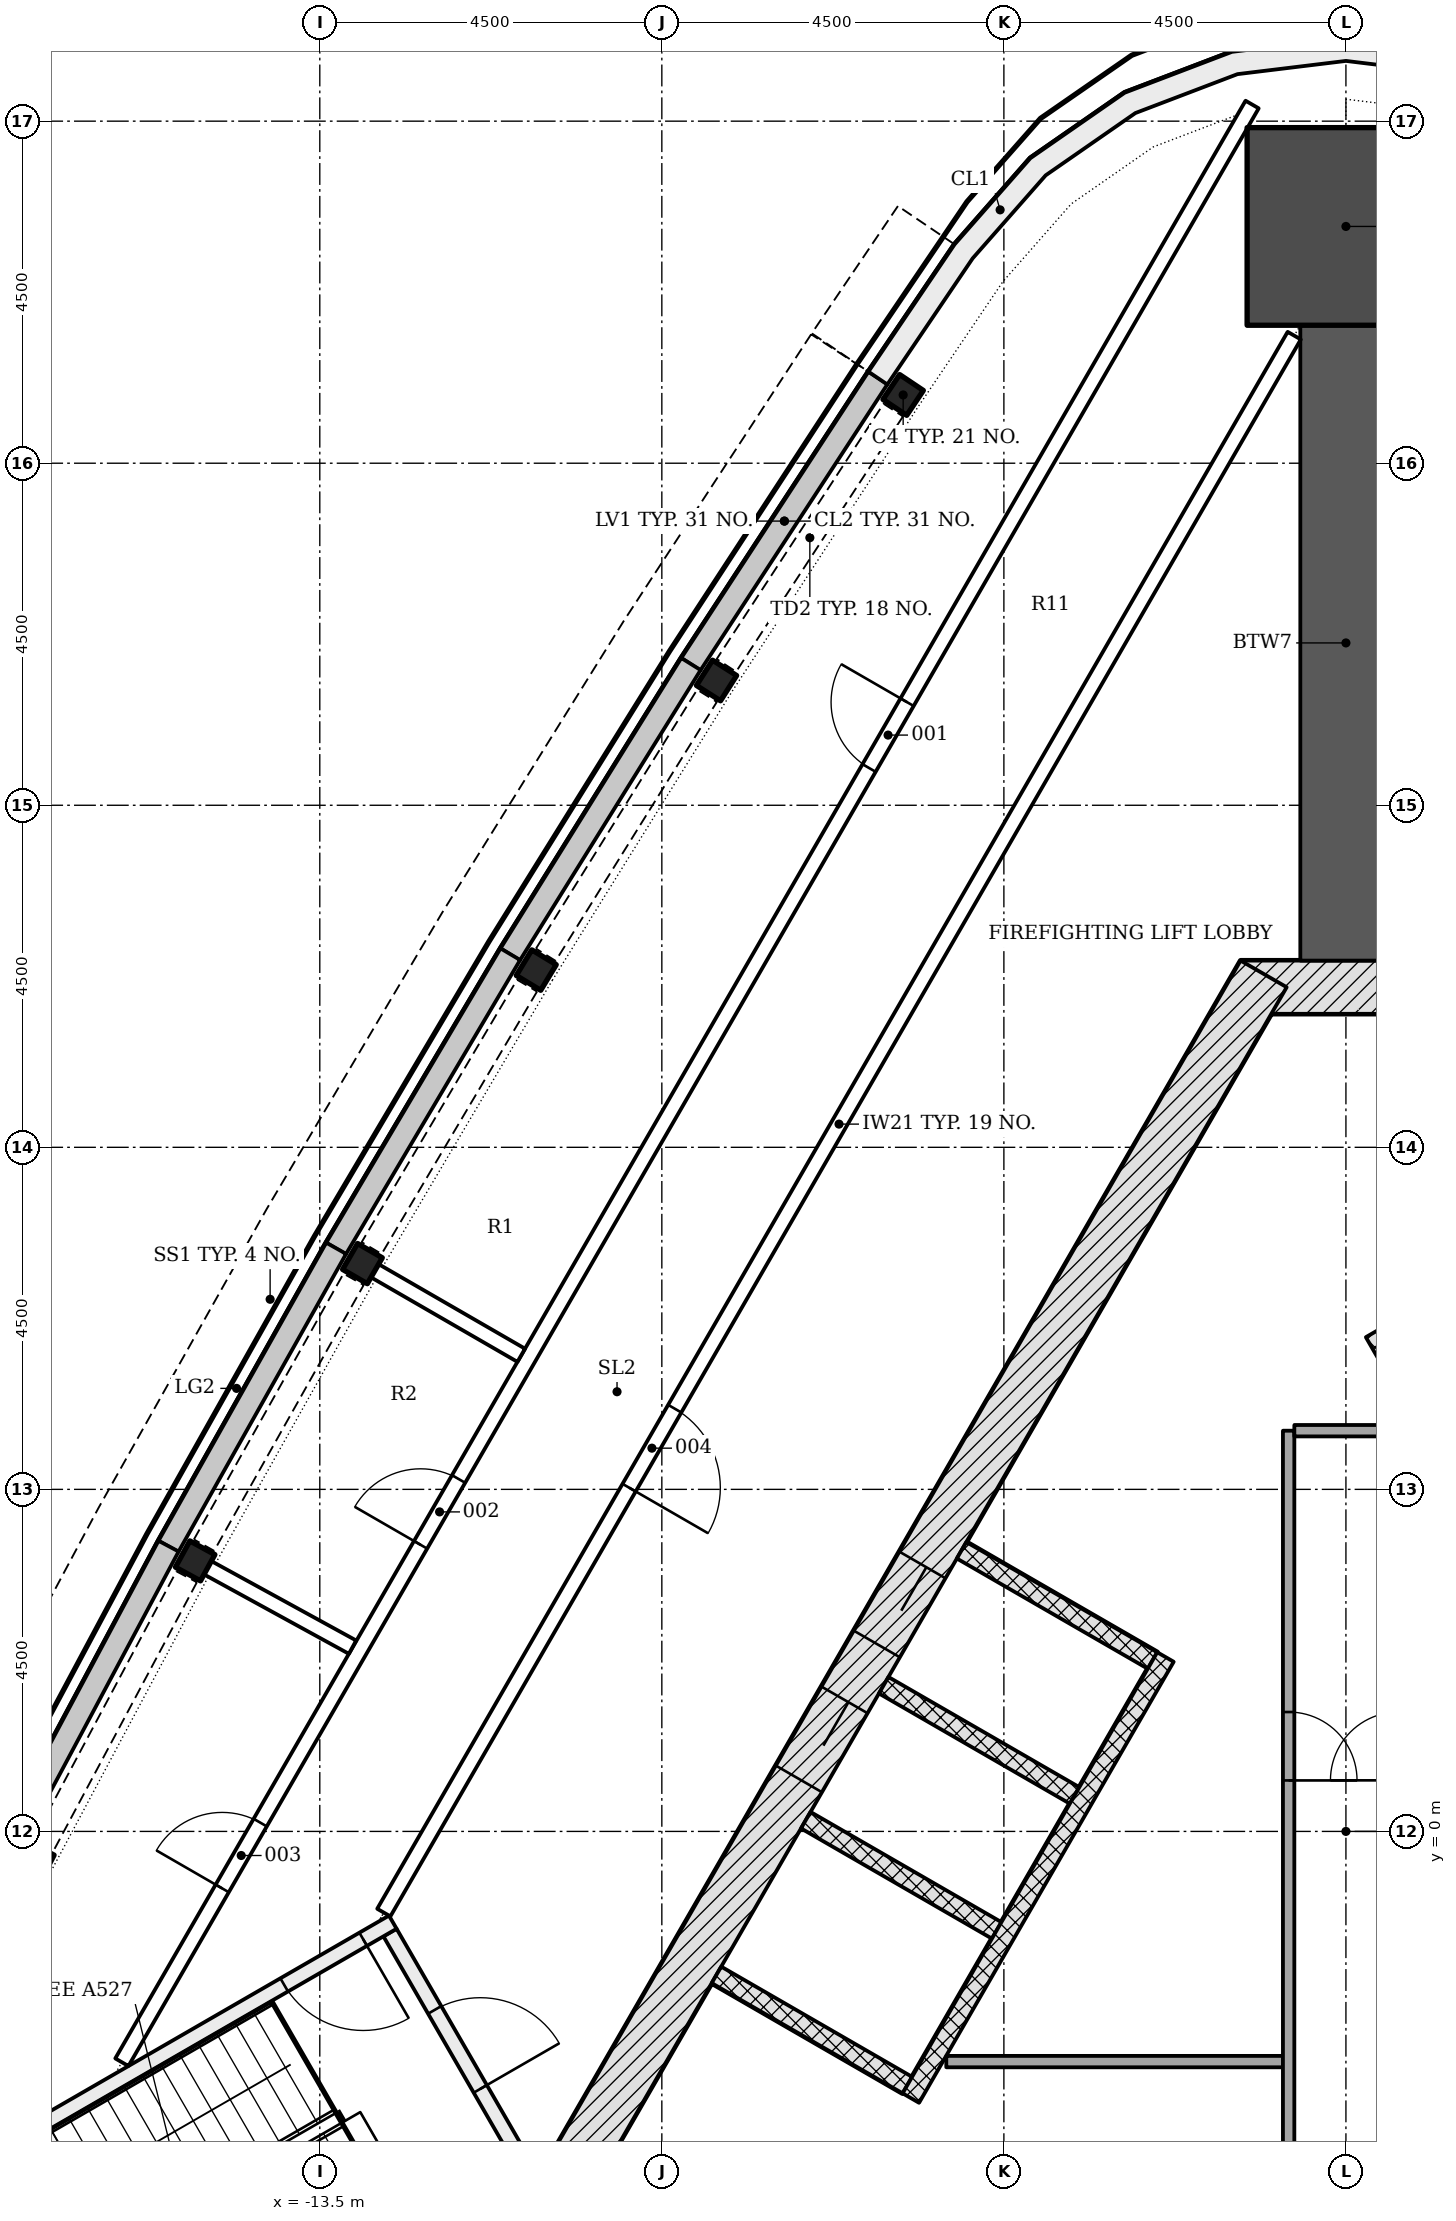
"""IFC4 building model, lengths in metres.
Left out: names, types, materials, properties, quantities, classifications, styles, units other than length and angle.
Written with IfcOpenShell. Run it as: python <this file> out.ifc"""

import sys

from ifc_helpers import new_model, si_unit, direction, frame, frame_2d, origin, origin_2d, place, context, subcontext, project, spatial, polyline, rectangle, i_section, outline, extrude, element, fill, save


model = new_model("IFC4")
c1 = context("Model", 3, precision=1e-05, world=origin(), true_north=direction((0.0, 1.0)))
c2 = subcontext(c1, "Body", "Model", "MODEL_VIEW")
j1 = project(units=[si_unit("LENGTHUNIT", "METRE"), si_unit("PLANEANGLEUNIT", "RADIAN")], contexts=[c1])
p1 = place(None, origin())
s1 = spatial("IfcSite", under=j1, at=p1, CompositionType="ELEMENT")
p2 = place(p1, origin())
s2 = spatial("IfcBuilding", under=s1, at=p2, CompositionType="ELEMENT")
p3 = place(p2, frame((0.0, 0.0, 210.3)))
s3 = spatial("IfcBuildingStorey", under=s2, at=p3, CompositionType="ELEMENT", Elevation=210.3)
p4 = place(p3, frame((1.386, 11.106, -0.3), z_axis=(0.0, 0.0, 1.0), x_axis=(-1.0, 0.0, 0.0)))
e1 = element("IfcWall", 1, at=p4, inside=s3, PredefinedType="SHEAR", context=c2, shape_type="SweptSolid", body=[
    extrude(rectangle(XDim=2.771, YDim=0.7, at=frame_2d((1.386, 0.0))), origin(), (0.0, 0.0, 1.0), 4.6),
])
p5 = place(p3, frame((-1.083, 11.281, -0.3), z_axis=(0.0, 0.0, 1.0), x_axis=(-0.500001446645, -0.866024568562, 0.0)))
e2 = element("IfcWall", 2, at=p5, inside=s3, PredefinedType="SHEAR", context=c2, shape_type="SweptSolid", body=[
    extrude(rectangle(XDim=18.458, YDim=0.7, at=frame_2d((9.229, 0.0))), origin(), (0.0, 0.0, 1.0), 4.6),
])
p6 = place(p5, frame((8.979, 0.0, 0.3)))
e3 = element("IfcOpeningElement", 3, at=p6, cuts=e2, PredefinedType="OPENING", context=c2, shape_type="SweptSolid", body=[
    extrude(rectangle(XDim=1.2, YDim=2.1, at=frame_2d((0.6, 1.05))), frame((0.0, 0.36, 0.0), z_axis=(0.0, -1.0, 0.0), x_axis=(1.0, 0.0, 0.0)), (0.0, 0.0, 1.0), 0.72),
])
p7 = place(p5, frame((11.029, 0.0, 0.3)))
e4 = element("IfcOpeningElement", 4, at=p7, cuts=e2, PredefinedType="OPENING", context=c2, shape_type="SweptSolid", body=[
    extrude(rectangle(XDim=1.2, YDim=2.1, at=frame_2d((0.6, 1.05))), frame((0.0, 0.36, 0.0), z_axis=(0.0, -1.0, 0.0), x_axis=(1.0, 0.0, 0.0)), (0.0, 0.0, 1.0), 0.72),
])
p8 = place(p3, frame((0.0, 11.456, -0.3), z_axis=(0.0, 0.0, 1.0), x_axis=(0.0, 1.0, 0.0)))
e5 = element("IfcWall", 5, at=p8, inside=s3, PredefinedType="SHEAR", context=c2, shape_type="SweptSolid", body=[
    extrude(rectangle(XDim=8.359, YDim=1.2, at=frame_2d((4.179, 0.0))), origin(), (0.0, 0.0, 1.0), 4.6),
])
p9 = place(p3, frame((0.0, 21.115, -0.3), z_axis=(0.0, 0.0, 1.0), x_axis=(0.0, 1.0, 0.0)))
e6 = element("IfcColumn", 6, at=p9, inside=s3, PredefinedType="COLUMN", context=c2, shape_type="SweptSolid", body=[
    extrude(rectangle(XDim=2.6, YDim=2.6, at=origin_2d()), origin(), (0.0, 0.0, 1.0), 4.6),
])
for number, where, z_axis, x_axis in (
    (7, (-5.825, 18.898, -0.3), (0.0, 0.0, 1.0), (-0.556, -0.831, 0.0)),
    (8, (-8.281, 15.142, -0.3), (0.0, 0.0, 1.0), (-0.538, -0.843, 0.0)),
    (9, (-10.652, 11.332, -0.3), (0.0, 0.0, 1.0), (-0.519, -0.855, 0.0)),
    (10, (-12.939, 7.47, -0.3), (0.0, 0.0, 1.0), (-0.5, -0.866, 0.0)),
    (11, (-15.14, 3.559, -0.3), (0.0, 0.0, 1.0), (-0.481, -0.877, 0.0)),
    (12, (-17.253, -0.4, -0.3), (0.0, 0.0, 1.0), (-0.461, -0.887, 0.0)),
):
    element("IfcColumn", number, at=place(p3, frame(where, z_axis=z_axis, x_axis=x_axis)), inside=s3, PredefinedType="COLUMN", context=c2, shape_type="SweptSolid", body=[
        extrude(i_section(OverallWidth=0.394, OverallDepth=0.376, WebThickness=0.017, FlangeThickness=0.028, FilletRadius=0.015, at=origin_2d()), origin(), (0.0, 0.0, 1.0), 4.6),
    ])
p10 = place(p3, origin())
e13 = element("IfcWall", 13, at=p10, inside=s3, PredefinedType="NOTDEFINED", context=c2, shape_type="SweptSolid", body=[
    extrude(outline(polyline([(-6.282, 19.204), (-8.744, 15.437), (-8.493, 15.273), (-6.031, 19.04), (-6.282, 19.204)])), origin(), (0.0, 0.0, 1.0), 1.2),
])
p11 = place(p3, origin())
e14 = element("IfcWall", 14, at=p11, inside=s3, PredefinedType="NOTDEFINED", context=c2, shape_type="SweptSolid", body=[
    extrude(outline(polyline([(-8.744, 15.437), (-11.122, 11.617), (-10.867, 11.458), (-8.49, 15.279), (-8.744, 15.437)])), origin(), (0.0, 0.0, 1.0), 1.2),
])
p12 = place(p3, origin())
e15 = element("IfcWall", 15, at=p12, inside=s3, PredefinedType="NOTDEFINED", context=c2, shape_type="SweptSolid", body=[
    extrude(outline(polyline([(-11.122, 11.617), (-13.415, 7.745), (-13.157, 7.592), (-10.864, 11.464), (-11.122, 11.617)])), origin(), (0.0, 0.0, 1.0), 1.2),
])
p13 = place(p3, origin())
e16 = element("IfcWall", 16, at=p13, inside=s3, PredefinedType="NOTDEFINED", context=c2, shape_type="SweptSolid", body=[
    extrude(outline(polyline([(-13.415, 7.745), (-15.622, 3.823), (-15.36, 3.677), (-13.154, 7.598), (-13.415, 7.745)])), origin(), (0.0, 0.0, 1.0), 1.2),
])
p14 = place(p3, origin())
e17 = element("IfcWall", 17, at=p14, inside=s3, PredefinedType="NOTDEFINED", context=c2, shape_type="SweptSolid", body=[
    extrude(outline(polyline([(-15.622, 3.823), (-17.741, -0.146), (-17.477, -0.287), (-15.357, 3.682), (-15.622, 3.823)])), origin(), (0.0, 0.0, 1.0), 1.2),
])
p15 = place(p3, origin())
e18 = element("IfcWall", 18, at=p15, inside=s3, PredefinedType="NOTDEFINED", context=c2, shape_type="SweptSolid", body=[
    extrude(outline(polyline([(6.282, 19.204), (5.149, 20.879), (4.151, 22.013), (2.911, 22.874), (1.499, 23.412), (0.0, 23.595), (-1.499, 23.412), (-2.911, 22.874), (-4.151, 22.013), (-5.149, 20.879), (-6.282, 19.204), (-6.034, 19.036), (-4.911, 20.695), (-3.95, 21.787), (-2.77, 22.607), (-1.427, 23.119), (0.0, 23.293), (1.427, 23.119), (2.77, 22.607), (3.95, 21.787), (4.911, 20.695), (6.034, 19.036), (6.282, 19.204)])), origin(), (0.0, 0.0, 1.0), 4.3),
])
p16 = place(p3, frame((5.87, -2.961, 0.0), z_axis=(0.0, 0.0, 1.0), x_axis=(-0.50000615651, 0.866021849293, 0.0)))
e19 = element("IfcWall", 19, at=p16, inside=s3, PredefinedType="PARTITIONING", context=c2, shape_type="SweptSolid", body=[
    extrude(rectangle(XDim=11.0, YDim=0.25, at=frame_2d((5.5, 0.0))), origin(), (0.0, 0.0, 1.0), 4.3),
])
for number, where, z_axis, x_axis in (
    (20, (-5.056, 3.699, -0.3), (0.0, 0.0, 1.0), (0.866, -0.5, 0.0)),
    (21, (-6.081, 1.923, -0.3), (0.0, 0.0, 1.0), (0.866, -0.5, 0.0)),
    (22, (-7.106, 0.148, -0.3), (0.0, 0.0, 1.0), (0.866, -0.5, 0.0)),
    (23, (-8.281, -1.887, -0.3), (0.0, 0.0, 1.0), (0.866, -0.5, 0.0)),
):
    element("IfcWall", number, at=place(p3, frame(where, z_axis=z_axis, x_axis=x_axis)), inside=s3, PredefinedType="PARTITIONING", context=c2, shape_type="SweptSolid", body=[
        extrude(rectangle(XDim=2.9, YDim=0.25, at=frame_2d((1.45, 0.0))), origin(), (0.0, 0.0, 1.0), 4.6),
    ])
p17 = place(p3, frame((-2.374, 2.294, 0.0), z_axis=(0.0, 0.0, 1.0), x_axis=(-0.500003174267, -0.866023571113, 0.0)))
e24 = element("IfcWall", 24, at=p17, inside=s3, PredefinedType="PARTITIONING", context=c2, shape_type="SweptSolid", body=[
    extrude(rectangle(XDim=6.7, YDim=0.25, at=frame_2d((3.35, 0.0))), origin(), (0.0, 0.0, 1.0), 4.3),
])
p18 = place(p3, frame((-5.258, -3.028, 0.0), z_axis=(0.0, 0.0, 1.0), x_axis=(1.0, 0.0, 0.0)))
e25 = element("IfcWall", 25, at=p18, inside=s3, PredefinedType="PARTITIONING", context=c2, shape_type="SweptSolid", body=[
    extrude(rectangle(XDim=4.429, YDim=0.15, at=frame_2d((2.215, 0.0))), origin(), (0.0, 0.0, 1.0), 4.3),
])
p19 = place(p3, frame((-0.754, 5.272, 0.0), z_axis=(0.0, 0.0, 1.0), x_axis=(0.0, -1.0, 0.0)))
e26 = element("IfcWall", 26, at=p19, inside=s3, PredefinedType="PARTITIONING", context=c2, shape_type="SweptSolid", body=[
    extrude(rectangle(XDim=11.5, YDim=0.15, at=frame_2d((5.75, 0.0))), origin(), (0.0, 0.0, 1.0), 4.3),
])
p20 = place(p19, frame((3.701, 0.0, 0.0)))
e27 = element("IfcOpeningElement", 27, at=p20, cuts=e26, PredefinedType="OPENING", context=c2, shape_type="SweptSolid", body=[
    extrude(rectangle(XDim=0.9, YDim=2.1, at=frame_2d((0.45, 1.05))), frame((0.0, 0.085, 0.0), z_axis=(0.0, -1.0, 0.0), x_axis=(1.0, 0.0, 0.0)), (0.0, 0.0, 1.0), 0.17),
])
p21 = place(p3, frame((-0.679, 5.272, 0.0), z_axis=(0.0, 0.0, 1.0), x_axis=(1.0, 0.0, 0.0)))
e28 = element("IfcWall", 28, at=p21, inside=s3, PredefinedType="PARTITIONING", context=c2, shape_type="SweptSolid", body=[
    extrude(rectangle(XDim=1.3, YDim=0.15, at=frame_2d((0.65, 0.0))), origin(), (0.0, 0.0, 1.0), 4.3),
])
p22 = place(p3, frame((-12.576, -1.331, -0.3), z_axis=(0.0, 0.0, 1.0), x_axis=(0.499970499736, -0.8660424351, 0.0)))
e29 = element("IfcWall", 29, at=p22, inside=s3, PredefinedType="SHEAR", context=c2, shape_type="SweptSolid", body=[
    extrude(rectangle(XDim=3.55, YDim=0.2, at=frame_2d((1.775, 0.0))), origin(), (0.0, 0.0, 1.0), 4.6),
])
p23 = place(p22, frame((1.175, 0.0, 0.3)))
e30 = element("IfcOpeningElement", 30, at=p23, cuts=e29, PredefinedType="OPENING", context=c2, shape_type="SweptSolid", body=[
    extrude(rectangle(XDim=1.2, YDim=2.1, at=frame_2d((0.6, 1.05))), frame((0.0, 0.11, 0.0), z_axis=(0.0, -1.0, 0.0), x_axis=(1.0, 0.0, 0.0)), (0.0, 0.0, 1.0), 0.22),
])
p24 = place(p3, frame((-12.539, -1.194, -0.3), z_axis=(0.0, 0.0, 1.0), x_axis=(-0.866045472092, -0.499965239061, 0.0)))
e31 = element("IfcWall", 31, at=p24, inside=s3, PredefinedType="SHEAR", context=c2, shape_type="SweptSolid", body=[
    extrude(rectangle(XDim=5.6, YDim=0.2, at=frame_2d((2.8, 0.0))), origin(), (0.0, 0.0, 1.0), 4.6),
])
p25 = place(p24, frame((0.45, 0.0, 0.3)))
e32 = element("IfcOpeningElement", 32, at=p25, cuts=e31, PredefinedType="OPENING", context=c2, shape_type="SweptSolid", body=[
    extrude(rectangle(XDim=1.2, YDim=2.1, at=frame_2d((0.6, 1.05))), frame((0.0, 0.11, 0.0), z_axis=(0.0, -1.0, 0.0), x_axis=(1.0, 0.0, 0.0)), (0.0, 0.0, 1.0), 0.22),
])
p26 = place(p3, frame((0.0, 0.0, -0.3)))
e33 = element("IfcWall", 33, at=p26, inside=s3, PredefinedType="SHEAR", context=c2, shape_type="SweptSolid", body=[
    extrude(outline(polyline([(-17.439, -3.907), (-18.025, -6.093), (-16.95, -7.955), (-16.777, -7.855), (-17.81, -6.065), (-17.267, -4.039), (-17.339, -4.081), (-17.339, -4.081), (-17.339, -4.081), (-17.339, -4.081), (-17.339, -4.081), (-17.339, -4.081), (-17.339, -4.081), (-17.339, -4.081), (-17.339, -4.081), (-17.339, -4.081), (-17.339, -4.081), (-17.339, -4.081), (-17.339, -4.081), (-17.339, -4.081), (-17.339, -4.081), (-17.339, -4.081), (-17.339, -4.081), (-17.439, -3.907)])), origin(), (0.0, 0.0, 1.0), 4.6),
])
p27 = place(p3, frame((-0.68, 19.678, 0.0), z_axis=(0.0, 0.0, 1.0), x_axis=(-0.49999622545, -0.866027583011, 0.0)))
e34 = element("IfcWall", 34, at=p27, inside=s3, PredefinedType="PARTITIONING", context=c2, shape_type="SweptSolid", body=[
    extrude(rectangle(XDim=23.956, YDim=0.2, at=frame_2d((11.978, 0.0))), origin(), (0.0, 0.0, 1.0), 3.752),
])
p28 = place(p27, frame((16.301, 0.0, 0.0)))
e35 = element("IfcOpeningElement", 35, at=p28, cuts=e34, PredefinedType="OPENING", context=c2, shape_type="SweptSolid", body=[
    extrude(rectangle(XDim=1.2, YDim=2.1, at=frame_2d((0.6, 1.05))), frame((0.0, 0.11, 0.0), z_axis=(0.0, -1.0, 0.0), x_axis=(1.0, 0.0, 0.0)), (0.0, 0.0, 1.0), 0.22),
])
p29 = place(p3, frame((-16.104, -3.037, 0.0), z_axis=(0.0, 0.0, 1.0), x_axis=(0.499996511208, 0.86602741803, 0.0)))
e36 = element("IfcWall", 36, at=p29, inside=s3, PredefinedType="PARTITIONING", context=c2, shape_type="SweptSolid", body=[
    extrude(rectangle(XDim=29.74, YDim=0.2, at=frame_2d((14.87, 0.0))), origin(), (0.0, 0.0, 1.0), 3.752),
])
p30 = place(p29, frame((19.661, 0.0, 0.0)))
e37 = element("IfcOpeningElement", 37, at=p30, cuts=e36, PredefinedType="OPENING", context=c2, shape_type="SweptSolid", body=[
    extrude(rectangle(XDim=1.0, YDim=2.1, at=frame_2d((0.5, 1.05))), frame((0.0, 0.11, 0.0), z_axis=(0.0, -1.0, 0.0), x_axis=(1.0, 0.0, 0.0)), (0.0, 0.0, 1.0), 0.22),
])
p31 = place(p29, frame((7.86, 0.0, 0.0)))
e38 = element("IfcOpeningElement", 38, at=p31, cuts=e36, PredefinedType="OPENING", context=c2, shape_type="SweptSolid", body=[
    extrude(rectangle(XDim=1.0, YDim=2.1, at=frame_2d((0.5, 1.05))), frame((0.0, 0.11, 0.0), z_axis=(0.0, -1.0, 0.0), x_axis=(1.0, 0.0, 0.0)), (0.0, 0.0, 1.0), 0.22),
])
p32 = place(p29, frame((2.64, 0.0, 0.0)))
e39 = element("IfcOpeningElement", 39, at=p32, cuts=e36, PredefinedType="OPENING", context=c2, shape_type="SweptSolid", body=[
    extrude(rectangle(XDim=1.0, YDim=2.1, at=frame_2d((0.5, 1.05))), frame((0.0, 0.11, 0.0), z_axis=(0.0, -1.0, 0.0), x_axis=(1.0, 0.0, 0.0)), (0.0, 0.0, 1.0), 0.22),
])
p33 = place(p3, frame((-12.809, 7.395, 0.0), z_axis=(0.0, 0.0, 1.0), x_axis=(0.866036427558, -0.499980905779, 0.0)))
e40 = element("IfcWall", 40, at=p33, inside=s3, PredefinedType="PARTITIONING", context=c2, shape_type="SweptSolid", body=[
    extrude(rectangle(XDim=2.262, YDim=0.2, at=frame_2d((1.131, 0.0))), origin(), (0.0, 0.0, 1.0), 3.752),
])
p34 = place(p3, frame((-15.008, 3.487, 0.0), z_axis=(0.0, 0.0, 1.0), x_axis=(0.876893493113, -0.480684721763, 0.0)))
e41 = element("IfcWall", 41, at=p34, inside=s3, PredefinedType="PARTITIONING", context=c2, shape_type="SweptSolid", body=[
    extrude(rectangle(XDim=2.211, YDim=0.2, at=frame_2d((1.105, 0.0))), origin(), (0.0, 0.0, 1.0), 3.752),
])
p35 = place(p6, origin())
e42 = element("IfcDoor", 42, at=p35, inside=s3, OperationType="DOUBLE_DOOR_SLIDING", PredefinedType="DOOR", context=c2, shape_type="SweptSolid", body=[
    extrude(rectangle(XDim=1.2, YDim=2.1, at=frame_2d((0.6, 1.05))), frame((0.0, 0.025, 0.0), z_axis=(0.0, -1.0, 0.0), x_axis=(1.0, 0.0, 0.0)), (0.0, 0.0, 1.0), 0.05),
])
fill(e3, e42)
p36 = place(p7, origin())
e43 = element("IfcDoor", 43, at=p36, inside=s3, OperationType="DOUBLE_DOOR_SLIDING", PredefinedType="DOOR", context=c2, shape_type="SweptSolid", body=[
    extrude(rectangle(XDim=1.2, YDim=2.1, at=frame_2d((0.6, 1.05))), frame((0.0, 0.025, 0.0), z_axis=(0.0, -1.0, 0.0), x_axis=(1.0, 0.0, 0.0)), (0.0, 0.0, 1.0), 0.05),
])
fill(e4, e43)
p37 = place(p20, origin())
e44 = element("IfcDoor", 44, at=p37, inside=s3, OperationType="SINGLE_SWING_RIGHT", PredefinedType="DOOR", context=c2, shape_type="SweptSolid", body=[
    extrude(rectangle(XDim=0.9, YDim=2.1, at=frame_2d((0.45, 1.05))), frame((0.0, 0.025, 0.0), z_axis=(0.0, -1.0, 0.0), x_axis=(1.0, 0.0, 0.0)), (0.0, 0.0, 1.0), 0.05),
])
fill(e27, e44)
p38 = place(p23, origin())
e45 = element("IfcDoor", 45, at=p38, inside=s3, OperationType="SINGLE_SWING_RIGHT", PredefinedType="DOOR", context=c2, shape_type="SweptSolid", body=[
    extrude(rectangle(XDim=1.2, YDim=2.1, at=frame_2d((0.6, 1.05))), frame((0.0, 0.025, 0.0), z_axis=(0.0, -1.0, 0.0), x_axis=(1.0, 0.0, 0.0)), (0.0, 0.0, 1.0), 0.05),
])
fill(e30, e45)
p39 = place(p25, origin())
e46 = element("IfcDoor", 46, at=p39, inside=s3, OperationType="SINGLE_SWING_LEFT", PredefinedType="DOOR", context=c2, shape_type="SweptSolid", body=[
    extrude(rectangle(XDim=1.2, YDim=2.1, at=frame_2d((0.6, 1.05))), frame((0.0, 0.025, 0.0), z_axis=(0.0, -1.0, 0.0), x_axis=(1.0, 0.0, 0.0)), (0.0, 0.0, 1.0), 0.05),
])
fill(e32, e46)
p40 = place(p30, origin())
e47 = element("IfcDoor", 47, at=p40, inside=s3, OperationType="SINGLE_SWING_RIGHT", PredefinedType="DOOR", context=c2, shape_type="SweptSolid", body=[
    extrude(rectangle(XDim=1.0, YDim=2.1, at=frame_2d((0.5, 1.05))), frame((0.0, 0.025, 0.0), z_axis=(0.0, -1.0, 0.0), x_axis=(1.0, 0.0, 0.0)), (0.0, 0.0, 1.0), 0.05),
])
fill(e37, e47)
p41 = place(p31, origin())
e48 = element("IfcDoor", 48, at=p41, inside=s3, OperationType="SINGLE_SWING_LEFT", PredefinedType="DOOR", context=c2, shape_type="SweptSolid", body=[
    extrude(rectangle(XDim=1.0, YDim=2.1, at=frame_2d((0.5, 1.05))), frame((0.0, 0.025, 0.0), z_axis=(0.0, -1.0, 0.0), x_axis=(1.0, 0.0, 0.0)), (0.0, 0.0, 1.0), 0.05),
])
fill(e38, e48)
p42 = place(p32, origin())
e49 = element("IfcDoor", 49, at=p42, inside=s3, OperationType="SINGLE_SWING_LEFT", PredefinedType="DOOR", context=c2, shape_type="SweptSolid", body=[
    extrude(rectangle(XDim=1.0, YDim=2.1, at=frame_2d((0.5, 1.05))), frame((0.0, 0.025, 0.0), z_axis=(0.0, -1.0, 0.0), x_axis=(1.0, 0.0, 0.0)), (0.0, 0.0, 1.0), 0.05),
])
fill(e39, e49)
p43 = place(p28, origin())
e50 = element("IfcDoor", 50, at=p43, inside=s3, OperationType="SINGLE_SWING_RIGHT", PredefinedType="DOOR", context=c2, shape_type="SweptSolid", body=[
    extrude(rectangle(XDim=1.2, YDim=2.1, at=frame_2d((0.6, 1.05))), frame((0.0, 0.025, 0.0), z_axis=(0.0, -1.0, 0.0), x_axis=(1.0, 0.0, 0.0)), (0.0, 0.0, 1.0), 0.05),
])
fill(e35, e50)
save(model, sys.argv[1])
